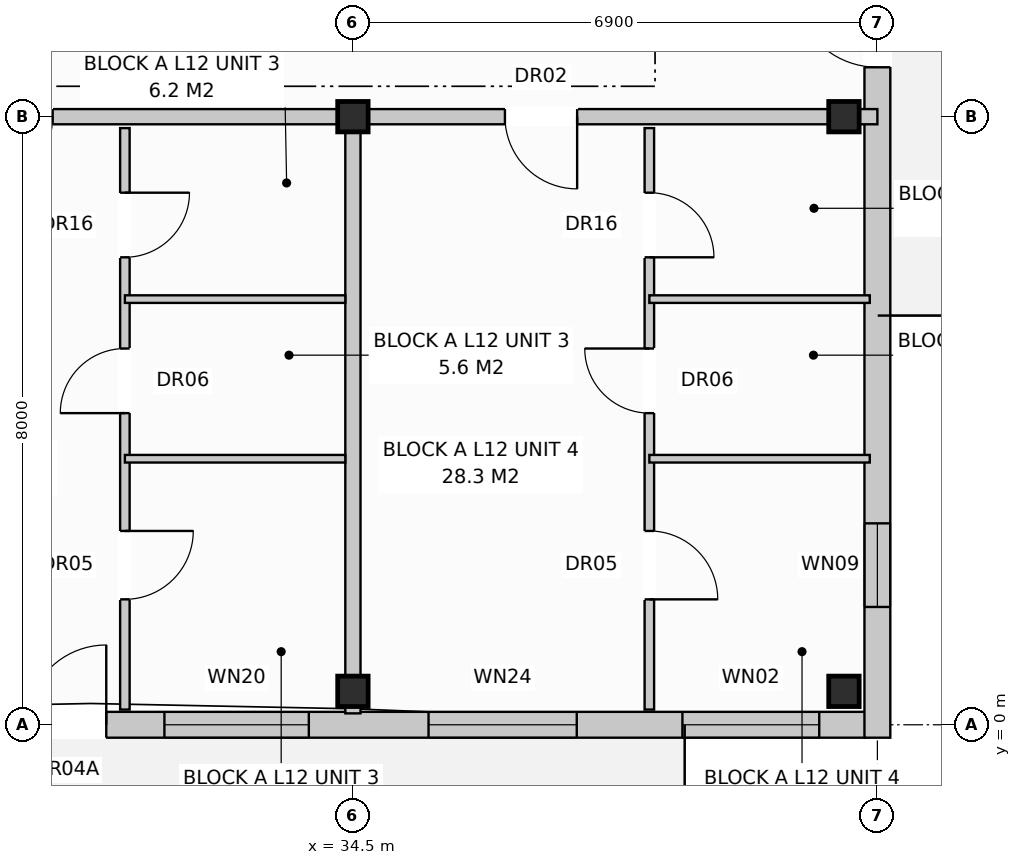
"""IFC4 building model, lengths in metres.
Left out: names, types, materials, properties, quantities, classifications, styles, units other than length and angle.
Written with IfcOpenShell. Run it as: python <this file> out.ifc"""

import sys

from ifc_helpers import new_model, si_unit, direction, frame, frame_2d, origin, origin_with_axes, origin_2d, place, context, subcontext, project, spatial, rectangle, extrude, element, fill, save


model = new_model("IFC4")
c1 = context("Model", 3, precision=1e-05, world=origin(), true_north=direction((0.0, 1.0)))
c2 = subcontext(c1, "Body", "Model", "MODEL_VIEW")
j1 = project(units=[si_unit("LENGTHUNIT", "METRE"), si_unit("PLANEANGLEUNIT", "RADIAN")], contexts=[c1])
p1 = place(None, origin())
s1 = spatial("IfcSite", under=j1, at=p1, CompositionType="ELEMENT")
p2 = place(p1, origin())
s2 = spatial("IfcBuilding", under=s1, at=p2, CompositionType="ELEMENT")
p3 = place(p2, frame((0.0, 0.0, 40.0)))
s3 = spatial("IfcBuildingStorey", under=s2, at=p3, CompositionType="ELEMENT", Elevation=40.0)
for number, where, z_axis, x_axis in (
    (1, (34.5, 0.44, 0.0), (0.0, 0.0, 1.0), (1.0, 0.0, 0.0)),
    (2, (34.5, 8.0, 0.0), (0.0, 0.0, 1.0), (1.0, 0.0, 0.0)),
    (3, (40.96, 0.44, 0.0), (0.0, 0.0, 1.0), (1.0, 0.0, 0.0)),
    (4, (40.96, 8.0, 0.0), (0.0, 0.0, 1.0), (1.0, 0.0, 0.0)),
):
    element("IfcColumn", number, at=place(p3, frame(where, z_axis=z_axis, x_axis=x_axis)), inside=s3, PredefinedType="COLUMN", context=c2, shape_type="SweptSolid", body=[
        extrude(rectangle(XDim=0.4, YDim=0.4, at=origin_2d()), origin(), (0.0, 0.0, 1.0), 3.2),
    ])
p4 = place(p3, frame((0.16, 0.0, 0.0), z_axis=(0.0, 0.0, 1.0), x_axis=(1.0, 0.0, 0.0)))
e5 = element("IfcWall", 5, at=p4, inside=s3, PredefinedType="STANDARD", context=c2, shape_type="SweptSolid", body=[
    extrude(rectangle(XDim=41.08, YDim=0.34, at=frame_2d((20.54, 0.0))), origin(), (0.0, 0.0, 1.0), 2.97),
])
p5 = place(p4, frame((2.745, 0.0, 0.0)))
e6 = element("IfcOpeningElement", 6, at=p5, cuts=e5, PredefinedType="OPENING", context=c2, shape_type="SweptSolid", body=[
    extrude(rectangle(XDim=1.05, YDim=2.12, at=frame_2d((0.525, 1.06))), frame((0.0, 0.182, 0.0), z_axis=(0.0, -1.0, 0.0), x_axis=(1.0, 0.0, 0.0)), (0.0, 0.0, 1.0), 0.364),
])
p6 = place(p4, frame((17.545, 0.0, 0.0)))
e7 = element("IfcOpeningElement", 7, at=p6, cuts=e5, PredefinedType="OPENING", context=c2, shape_type="SweptSolid", body=[
    extrude(rectangle(XDim=1.05, YDim=2.12, at=frame_2d((0.525, 1.06))), frame((0.0, 0.182, 0.0), z_axis=(0.0, -1.0, 0.0), x_axis=(1.0, 0.0, 0.0)), (0.0, 0.0, 1.0), 0.364),
])
p7 = place(p4, frame((30.045, 0.0, 0.0)))
e8 = element("IfcOpeningElement", 8, at=p7, cuts=e5, PredefinedType="OPENING", context=c2, shape_type="SweptSolid", body=[
    extrude(rectangle(XDim=1.05, YDim=2.12, at=frame_2d((0.525, 1.06))), frame((0.0, 0.182, 0.0), z_axis=(0.0, -1.0, 0.0), x_axis=(1.0, 0.0, 0.0)), (0.0, 0.0, 1.0), 0.364),
])
p8 = place(p4, frame((0.61, 0.0, 0.8)))
e9 = element("IfcOpeningElement", 9, at=p8, cuts=e5, PredefinedType="OPENING", context=c2, shape_type="SweptSolid", body=[
    extrude(rectangle(XDim=1.8, YDim=1.7, at=frame_2d((0.9, 0.85))), frame((0.0, 0.182, 0.0), z_axis=(0.0, -1.0, 0.0), x_axis=(1.0, 0.0, 0.0)), (0.0, 0.0, 1.0), 0.364),
])
p9 = place(p4, frame((4.36, 0.0, 0.72)))
e10 = element("IfcOpeningElement", 10, at=p9, cuts=e5, PredefinedType="OPENING", context=c2, shape_type="SweptSolid", body=[
    extrude(rectangle(XDim=1.9, YDim=1.85, at=frame_2d((0.95, 0.925))), frame((0.0, 0.182, 0.0), z_axis=(0.0, -1.0, 0.0), x_axis=(1.0, 0.0, 0.0)), (0.0, 0.0, 1.0), 0.364),
])
p10 = place(p4, frame((10.46, 0.0, 0.72)))
e11 = element("IfcOpeningElement", 11, at=p10, cuts=e5, PredefinedType="OPENING", context=c2, shape_type="SweptSolid", body=[
    extrude(rectangle(XDim=1.1, YDim=1.5, at=frame_2d((0.55, 0.75))), frame((0.0, 0.182, 0.0), z_axis=(0.0, -1.0, 0.0), x_axis=(1.0, 0.0, 0.0)), (0.0, 0.0, 1.0), 0.364),
])
p11 = place(p4, frame((15.76, 0.0, 0.72)))
e12 = element("IfcOpeningElement", 12, at=p11, cuts=e5, PredefinedType="OPENING", context=c2, shape_type="SweptSolid", body=[
    extrude(rectangle(XDim=1.1, YDim=1.5, at=frame_2d((0.55, 0.75))), frame((0.0, 0.182, 0.0), z_axis=(0.0, -1.0, 0.0), x_axis=(1.0, 0.0, 0.0)), (0.0, 0.0, 1.0), 0.364),
])
p12 = place(p4, frame((21.042, 0.0, 0.72)))
e13 = element("IfcOpeningElement", 13, at=p12, cuts=e5, PredefinedType="OPENING", context=c2, shape_type="SweptSolid", body=[
    extrude(rectangle(XDim=1.9, YDim=1.85, at=frame_2d((0.95, 0.925))), frame((0.0, 0.182, 0.0), z_axis=(0.0, -1.0, 0.0), x_axis=(1.0, 0.0, 0.0)), (0.0, 0.0, 1.0), 0.364),
])
p13 = place(p4, frame((24.66, 0.0, 0.72)))
e14 = element("IfcOpeningElement", 14, at=p13, cuts=e5, PredefinedType="OPENING", context=c2, shape_type="SweptSolid", body=[
    extrude(rectangle(XDim=1.1, YDim=1.5, at=frame_2d((0.55, 0.75))), frame((0.0, 0.182, 0.0), z_axis=(0.0, -1.0, 0.0), x_axis=(1.0, 0.0, 0.0)), (0.0, 0.0, 1.0), 0.364),
])
p14 = place(p4, frame((28.21, 0.0, 0.85)))
e15 = element("IfcOpeningElement", 15, at=p14, cuts=e5, PredefinedType="OPENING", context=c2, shape_type="SweptSolid", body=[
    extrude(rectangle(XDim=1.5, YDim=1.65, at=frame_2d((0.75, 0.825))), frame((0.0, 0.182, 0.0), z_axis=(0.0, -1.0, 0.0), x_axis=(1.0, 0.0, 0.0)), (0.0, 0.0, 1.0), 0.364),
])
p15 = place(p4, frame((31.86, 0.0, 0.72)))
e16 = element("IfcOpeningElement", 16, at=p15, cuts=e5, PredefinedType="OPENING", context=c2, shape_type="SweptSolid", body=[
    extrude(rectangle(XDim=1.9, YDim=1.85, at=frame_2d((0.95, 0.925))), frame((0.0, 0.182, 0.0), z_axis=(0.0, -1.0, 0.0), x_axis=(1.0, 0.0, 0.0)), (0.0, 0.0, 1.0), 0.364),
])
p16 = place(p4, frame((35.335, 0.0, 0.8)))
e17 = element("IfcOpeningElement", 17, at=p16, cuts=e5, PredefinedType="OPENING", context=c2, shape_type="SweptSolid", body=[
    extrude(rectangle(XDim=1.95, YDim=1.65, at=frame_2d((0.975, 0.825))), frame((0.0, 0.182, 0.0), z_axis=(0.0, -1.0, 0.0), x_axis=(1.0, 0.0, 0.0)), (0.0, 0.0, 1.0), 0.364),
])
p17 = place(p4, frame((38.675, 0.0, 0.8)))
e18 = element("IfcOpeningElement", 18, at=p17, cuts=e5, PredefinedType="OPENING", context=c2, shape_type="SweptSolid", body=[
    extrude(rectangle(XDim=1.8, YDim=1.7, at=frame_2d((0.9, 0.85))), frame((0.0, 0.182, 0.0), z_axis=(0.0, -1.0, 0.0), x_axis=(1.0, 0.0, 0.0)), (0.0, 0.0, 1.0), 0.364),
])
p18 = place(p3, frame((41.4, -0.17, 0.0), z_axis=(0.0, 0.0, 1.0), x_axis=(0.0, 1.0, 0.0)))
e19 = element("IfcWall", 19, at=p18, inside=s3, PredefinedType="STANDARD", context=c2, shape_type="SweptSolid", body=[
    extrude(rectangle(XDim=18.74, YDim=0.34, at=frame_2d((9.37, 0.0))), origin(), (0.0, 0.0, 1.0), 2.97),
])
p19 = place(p18, frame((8.82, 0.0, 0.0)))
e20 = element("IfcOpeningElement", 20, at=p19, cuts=e19, PredefinedType="OPENING", context=c2, shape_type="SweptSolid", body=[
    extrude(rectangle(XDim=1.1, YDim=2.1, at=frame_2d((0.55, 1.05))), frame((0.0, 0.182, 0.0), z_axis=(0.0, -1.0, 0.0), x_axis=(1.0, 0.0, 0.0)), (0.0, 0.0, 1.0), 0.364),
])
p20 = place(p18, frame((1.72, 0.0, 0.72)))
e21 = element("IfcOpeningElement", 21, at=p20, cuts=e19, PredefinedType="OPENING", context=c2, shape_type="SweptSolid", body=[
    extrude(rectangle(XDim=1.1, YDim=1.5, at=frame_2d((0.55, 0.75))), frame((0.0, 0.182, 0.0), z_axis=(0.0, -1.0, 0.0), x_axis=(1.0, 0.0, 0.0)), (0.0, 0.0, 1.0), 0.364),
])
p21 = place(p18, frame((15.92, 0.0, 0.72)))
e22 = element("IfcOpeningElement", 22, at=p21, cuts=e19, PredefinedType="OPENING", context=c2, shape_type="SweptSolid", body=[
    extrude(rectangle(XDim=1.1, YDim=1.5, at=frame_2d((0.55, 0.75))), frame((0.0, 0.182, 0.0), z_axis=(0.0, -1.0, 0.0), x_axis=(1.0, 0.0, 0.0)), (0.0, 0.0, 1.0), 0.364),
])
p22 = place(p3, frame((34.5, 7.85, 0.0), z_axis=(0.0, 0.0, 1.0), x_axis=(0.0, -1.0, 0.0)))
e23 = element("IfcWall", 23, at=p22, inside=s3, PredefinedType="PARTITIONING", context=c2, shape_type="SweptSolid", body=[
    extrude(rectangle(XDim=7.7, YDim=0.2, at=frame_2d((3.85, 0.0))), origin(), (0.0, 0.0, 1.0), 2.41),
])
p23 = place(p3, frame((27.6, 8.0, 0.0), z_axis=(0.0, 0.0, 1.0), x_axis=(1.0, 0.0, 0.0)))
e24 = element("IfcWall", 24, at=p23, inside=s3, PredefinedType="PARTITIONING", context=c2, shape_type="SweptSolid", body=[
    extrude(rectangle(XDim=6.9, YDim=0.2, at=frame_2d((3.45, 0.0))), origin(), (0.0, 0.0, 1.0), 2.41),
])
p24 = place(p23, frame((2.0, 0.0, 0.0)))
e25 = element("IfcOpeningElement", 25, at=p24, cuts=e24, PredefinedType="OPENING", context=c2, shape_type="SweptSolid", body=[
    extrude(rectangle(XDim=0.95, YDim=2.15, at=frame_2d((0.475, 1.075))), frame((0.0, 0.112, 0.0), z_axis=(0.0, -1.0, 0.0), x_axis=(1.0, 0.0, 0.0)), (0.0, 0.0, 1.0), 0.224),
])
p25 = place(p3, frame((31.5, 7.85, 0.0), z_axis=(0.0, 0.0, 1.0), x_axis=(0.0, -1.0, 0.0)))
e26 = element("IfcWall", 26, at=p25, inside=s3, PredefinedType="PARTITIONING", context=c2, shape_type="SweptSolid", body=[
    extrude(rectangle(XDim=7.65, YDim=0.125, at=frame_2d((3.825, 0.0))), origin(), (0.0, 0.0, 1.0), 2.97),
])
p26 = place(p25, frame((0.85, 0.0, 0.0)))
e27 = element("IfcOpeningElement", 27, at=p26, cuts=e26, PredefinedType="OPENING", context=c2, shape_type="SweptSolid", body=[
    extrude(rectangle(XDim=0.85, YDim=2.1, at=frame_2d((0.425, 1.05))), frame((0.0, 0.074, 0.0), z_axis=(0.0, -1.0, 0.0), x_axis=(1.0, 0.0, 0.0)), (0.0, 0.0, 1.0), 0.149),
])
p27 = place(p25, frame((2.9, 0.0, 0.0)))
e28 = element("IfcOpeningElement", 28, at=p27, cuts=e26, PredefinedType="OPENING", context=c2, shape_type="SweptSolid", body=[
    extrude(rectangle(XDim=0.85, YDim=2.05, at=frame_2d((0.425, 1.025))), frame((0.0, 0.074, 0.0), z_axis=(0.0, -1.0, 0.0), x_axis=(1.0, 0.0, 0.0)), (0.0, 0.0, 1.0), 0.149),
])
p28 = place(p25, frame((5.3, 0.0, 0.0)))
e29 = element("IfcOpeningElement", 29, at=p28, cuts=e26, PredefinedType="OPENING", context=c2, shape_type="SweptSolid", body=[
    extrude(rectangle(XDim=0.9, YDim=2.1, at=frame_2d((0.45, 1.05))), frame((0.0, 0.074, 0.0), z_axis=(0.0, -1.0, 0.0), x_axis=(1.0, 0.0, 0.0)), (0.0, 0.0, 1.0), 0.149),
])
for number, where, z_axis, x_axis in (
    (30, (31.5, 5.6, 0.0), (0.0, 0.0, 1.0), (1.0, 0.0, 0.0)),
    (31, (31.5, 3.5, 0.0), (0.0, 0.0, 1.0), (1.0, 0.0, 0.0)),
):
    element("IfcWall", number, at=place(p3, frame(where, z_axis=z_axis, x_axis=x_axis)), inside=s3, PredefinedType="PARTITIONING", context=c2, shape_type="SweptSolid", body=[
        extrude(rectangle(XDim=2.9, YDim=0.1, at=frame_2d((1.45, 0.0))), origin(), (0.0, 0.0, 1.0), 2.97),
    ])
p29 = place(p3, frame((34.5, 8.0, 0.0), z_axis=(0.0, 0.0, 1.0), x_axis=(1.0, 0.0, 0.0)))
e32 = element("IfcWall", 32, at=p29, inside=s3, PredefinedType="PARTITIONING", context=c2, shape_type="SweptSolid", body=[
    extrude(rectangle(XDim=6.9, YDim=0.2, at=frame_2d((3.45, 0.0))), origin(), (0.0, 0.0, 1.0), 2.41),
])
p30 = place(p29, frame((2.0, 0.0, 0.0)))
e33 = element("IfcOpeningElement", 33, at=p30, cuts=e32, PredefinedType="OPENING", context=c2, shape_type="SweptSolid", body=[
    extrude(rectangle(XDim=0.95, YDim=2.15, at=frame_2d((0.475, 1.075))), frame((0.0, 0.112, 0.0), z_axis=(0.0, -1.0, 0.0), x_axis=(1.0, 0.0, 0.0)), (0.0, 0.0, 1.0), 0.224),
])
p31 = place(p3, frame((38.4, 7.85, 0.0), z_axis=(0.0, 0.0, 1.0), x_axis=(0.0, -1.0, 0.0)))
e34 = element("IfcWall", 34, at=p31, inside=s3, PredefinedType="PARTITIONING", context=c2, shape_type="SweptSolid", body=[
    extrude(rectangle(XDim=7.65, YDim=0.125, at=frame_2d((3.825, 0.0))), origin(), (0.0, 0.0, 1.0), 2.97),
])
p32 = place(p31, frame((0.85, 0.0, 0.0)))
e35 = element("IfcOpeningElement", 35, at=p32, cuts=e34, PredefinedType="OPENING", context=c2, shape_type="SweptSolid", body=[
    extrude(rectangle(XDim=0.85, YDim=2.1, at=frame_2d((0.425, 1.05))), frame((0.0, 0.074, 0.0), z_axis=(0.0, -1.0, 0.0), x_axis=(1.0, 0.0, 0.0)), (0.0, 0.0, 1.0), 0.149),
])
p33 = place(p31, frame((2.9, 0.0, 0.0)))
e36 = element("IfcOpeningElement", 36, at=p33, cuts=e34, PredefinedType="OPENING", context=c2, shape_type="SweptSolid", body=[
    extrude(rectangle(XDim=0.85, YDim=2.05, at=frame_2d((0.425, 1.025))), frame((0.0, 0.074, 0.0), z_axis=(0.0, -1.0, 0.0), x_axis=(1.0, 0.0, 0.0)), (0.0, 0.0, 1.0), 0.149),
])
p34 = place(p31, frame((5.3, 0.0, 0.0)))
e37 = element("IfcOpeningElement", 37, at=p34, cuts=e34, PredefinedType="OPENING", context=c2, shape_type="SweptSolid", body=[
    extrude(rectangle(XDim=0.9, YDim=2.1, at=frame_2d((0.45, 1.05))), frame((0.0, 0.074, 0.0), z_axis=(0.0, -1.0, 0.0), x_axis=(1.0, 0.0, 0.0)), (0.0, 0.0, 1.0), 0.149),
])
for number, where, z_axis, x_axis in (
    (38, (38.4, 5.6, 0.0), (0.0, 0.0, 1.0), (1.0, 0.0, 0.0)),
    (39, (38.4, 3.5, 0.0), (0.0, 0.0, 1.0), (1.0, 0.0, 0.0)),
):
    element("IfcWall", number, at=place(p3, frame(where, z_axis=z_axis, x_axis=x_axis)), inside=s3, PredefinedType="PARTITIONING", context=c2, shape_type="SweptSolid", body=[
        extrude(rectangle(XDim=2.9, YDim=0.1, at=frame_2d((1.45, 0.0))), origin(), (0.0, 0.0, 1.0), 2.97),
    ])
p35 = place(p7, origin_with_axes())
e40 = element("IfcDoor", 40, at=p35, inside=s3, OperationType="SINGLE_SWING_RIGHT", PredefinedType="DOOR", context=c2, shape_type="SweptSolid", body=[
    extrude(rectangle(XDim=1.05, YDim=2.12, at=frame_2d((0.525, 1.06))), frame((0.0, 0.025, 0.0), z_axis=(0.0, -1.0, 0.0), x_axis=(1.0, 0.0, 0.0)), (0.0, 0.0, 1.0), 0.05),
])
fill(e8, e40)
p36 = place(p15, origin_with_axes())
e41 = element("IfcWindow", 41, at=p36, inside=s3, PartitioningType="SINGLE_PANEL", PredefinedType="WINDOW", context=c2, shape_type="SweptSolid", body=[
    extrude(rectangle(XDim=1.9, YDim=1.85, at=frame_2d((0.95, 0.925))), frame((0.0, 0.03, 0.0), z_axis=(0.0, -1.0, 0.0), x_axis=(1.0, 0.0, 0.0)), (0.0, 0.0, 1.0), 0.06),
])
fill(e16, e41)
p37 = place(p16, origin_with_axes())
e42 = element("IfcWindow", 42, at=p37, inside=s3, PartitioningType="SINGLE_PANEL", PredefinedType="WINDOW", context=c2, shape_type="SweptSolid", body=[
    extrude(rectangle(XDim=1.95, YDim=1.65, at=frame_2d((0.975, 0.825))), frame((0.0, 0.03, 0.0), z_axis=(0.0, -1.0, 0.0), x_axis=(1.0, 0.0, 0.0)), (0.0, 0.0, 1.0), 0.06),
])
fill(e17, e42)
p38 = place(p17, origin_with_axes())
e43 = element("IfcWindow", 43, at=p38, inside=s3, PartitioningType="SINGLE_PANEL", PredefinedType="WINDOW", context=c2, shape_type="SweptSolid", body=[
    extrude(rectangle(XDim=1.8, YDim=1.7, at=frame_2d((0.9, 0.85))), frame((0.0, 0.03, 0.0), z_axis=(0.0, -1.0, 0.0), x_axis=(1.0, 0.0, 0.0)), (0.0, 0.0, 1.0), 0.06),
])
fill(e18, e43)
p39 = place(p19, origin_with_axes())
e44 = element("IfcDoor", 44, at=p39, inside=s3, OperationType="SINGLE_SWING_RIGHT", PredefinedType="DOOR", context=c2, shape_type="SweptSolid", body=[
    extrude(rectangle(XDim=1.1, YDim=2.1, at=frame_2d((0.55, 1.05))), frame((0.0, 0.025, 0.0), z_axis=(0.0, -1.0, 0.0), x_axis=(1.0, 0.0, 0.0)), (0.0, 0.0, 1.0), 0.05),
])
fill(e20, e44)
p40 = place(p20, origin_with_axes())
e45 = element("IfcWindow", 45, at=p40, inside=s3, PartitioningType="SINGLE_PANEL", PredefinedType="WINDOW", context=c2, shape_type="SweptSolid", body=[
    extrude(rectangle(XDim=1.1, YDim=1.5, at=frame_2d((0.55, 0.75))), frame((0.0, 0.03, 0.0), z_axis=(0.0, -1.0, 0.0), x_axis=(1.0, 0.0, 0.0)), (0.0, 0.0, 1.0), 0.06),
])
fill(e21, e45)
p41 = place(p26, origin_with_axes())
e46 = element("IfcDoor", 46, at=p41, inside=s3, OperationType="SINGLE_SWING_LEFT", PredefinedType="DOOR", context=c2, shape_type="SweptSolid", body=[
    extrude(rectangle(XDim=0.85, YDim=2.1, at=frame_2d((0.425, 1.05))), frame((0.0, 0.025, 0.0), z_axis=(0.0, -1.0, 0.0), x_axis=(1.0, 0.0, 0.0)), (0.0, 0.0, 1.0), 0.05),
])
fill(e27, e46)
p42 = place(p27, frame((0.85, 0.0, 0.0), z_axis=(0.0, 0.0, 1.0), x_axis=(-1.0, 0.0, 0.0)))
e47 = element("IfcDoor", 47, at=p42, inside=s3, OperationType="SINGLE_SWING_RIGHT", PredefinedType="DOOR", context=c2, shape_type="SweptSolid", body=[
    extrude(rectangle(XDim=0.85, YDim=2.05, at=frame_2d((0.425, 1.025))), frame((0.0, 0.025, 0.0), z_axis=(0.0, -1.0, 0.0), x_axis=(1.0, 0.0, 0.0)), (0.0, 0.0, 1.0), 0.05),
])
fill(e28, e47)
p43 = place(p28, origin_with_axes())
e48 = element("IfcDoor", 48, at=p43, inside=s3, OperationType="SINGLE_SWING_LEFT", PredefinedType="DOOR", context=c2, shape_type="SweptSolid", body=[
    extrude(rectangle(XDim=0.9, YDim=2.1, at=frame_2d((0.45, 1.05))), frame((0.0, 0.025, 0.0), z_axis=(0.0, -1.0, 0.0), x_axis=(1.0, 0.0, 0.0)), (0.0, 0.0, 1.0), 0.05),
])
fill(e29, e48)
p44 = place(p30, frame((0.95, 0.0, 0.0), z_axis=(0.0, 0.0, 1.0), x_axis=(-1.0, 0.0, 0.0)))
e49 = element("IfcDoor", 49, at=p44, inside=s3, OperationType="SINGLE_SWING_RIGHT", PredefinedType="DOOR", context=c2, shape_type="SweptSolid", body=[
    extrude(rectangle(XDim=0.95, YDim=2.15, at=frame_2d((0.475, 1.075))), frame((0.0, 0.025, 0.0), z_axis=(0.0, -1.0, 0.0), x_axis=(1.0, 0.0, 0.0)), (0.0, 0.0, 1.0), 0.05),
])
fill(e33, e49)
p45 = place(p32, origin_with_axes())
e50 = element("IfcDoor", 50, at=p45, inside=s3, OperationType="SINGLE_SWING_RIGHT", PredefinedType="DOOR", context=c2, shape_type="SweptSolid", body=[
    extrude(rectangle(XDim=0.85, YDim=2.1, at=frame_2d((0.425, 1.05))), frame((0.0, 0.025, 0.0), z_axis=(0.0, -1.0, 0.0), x_axis=(1.0, 0.0, 0.0)), (0.0, 0.0, 1.0), 0.05),
])
fill(e35, e50)
p46 = place(p33, frame((0.85, 0.0, 0.0), z_axis=(0.0, 0.0, 1.0), x_axis=(-1.0, 0.0, 0.0)))
e51 = element("IfcDoor", 51, at=p46, inside=s3, OperationType="SINGLE_SWING_LEFT", PredefinedType="DOOR", context=c2, shape_type="SweptSolid", body=[
    extrude(rectangle(XDim=0.85, YDim=2.05, at=frame_2d((0.425, 1.025))), frame((0.0, 0.025, 0.0), z_axis=(0.0, -1.0, 0.0), x_axis=(1.0, 0.0, 0.0)), (0.0, 0.0, 1.0), 0.05),
])
fill(e36, e51)
p47 = place(p34, origin_with_axes())
e52 = element("IfcDoor", 52, at=p47, inside=s3, OperationType="SINGLE_SWING_RIGHT", PredefinedType="DOOR", context=c2, shape_type="SweptSolid", body=[
    extrude(rectangle(XDim=0.9, YDim=2.1, at=frame_2d((0.45, 1.05))), frame((0.0, 0.025, 0.0), z_axis=(0.0, -1.0, 0.0), x_axis=(1.0, 0.0, 0.0)), (0.0, 0.0, 1.0), 0.05),
])
fill(e37, e52)
save(model, sys.argv[1])
